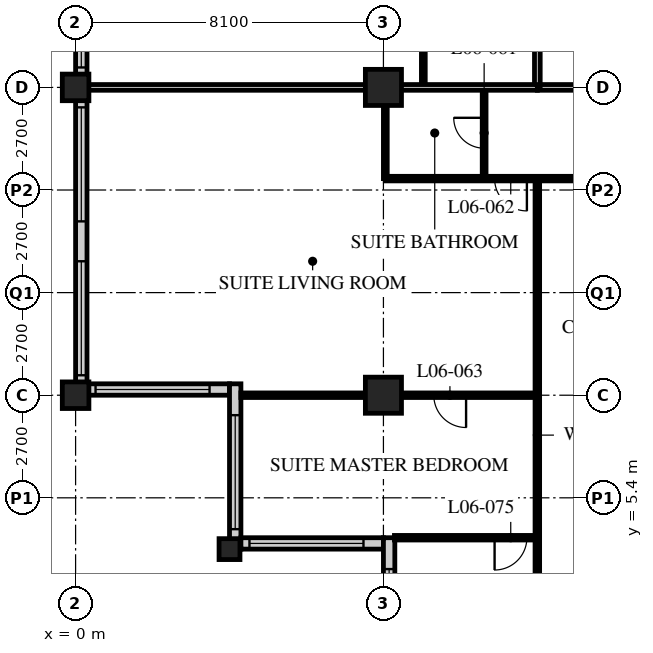
"""IFC4 building model, lengths in metres.
Left out: names, types, materials, properties, quantities, classifications, styles, units other than length and angle.
Written with IfcOpenShell. Run it as: python <this file> out.ifc"""

import sys

from ifc_helpers import new_model, si_unit, direction, frame, frame_2d, origin, origin_2d, place, context, subcontext, project, spatial, rectangle, hollow_rectangle, extrude, element, fill, save


model = new_model("IFC4")
c1 = context("Model", 3, precision=1e-05, world=origin(), true_north=direction((0.0, 1.0)))
c2 = subcontext(c1, "Body", "Model", "MODEL_VIEW")
j1 = project(units=[si_unit("LENGTHUNIT", "METRE"), si_unit("PLANEANGLEUNIT", "RADIAN")], contexts=[c1])
p1 = place(None, origin())
s1 = spatial("IfcSite", under=j1, at=p1, CompositionType="ELEMENT")
p2 = place(p1, origin())
s2 = spatial("IfcBuilding", under=s1, at=p2, CompositionType="ELEMENT")
p3 = place(p2, frame((0.0, 0.0, 33.0)))
s3 = spatial("IfcBuildingStorey", under=s2, at=p3, CompositionType="ELEMENT", Elevation=33.0)
for number, where, z_axis, x_axis in (
    (1, (0.0, 8.1, 0.0), (0.0, 0.0, 1.0), (1.0, 0.0, 0.0)),
    (2, (0.0, 16.2, 0.0), (0.0, 0.0, 1.0), (1.0, 0.0, 0.0)),
):
    element("IfcColumn", number, at=place(p3, frame(where, z_axis=z_axis, x_axis=x_axis)), inside=s3, PredefinedType="COLUMN", context=c2, shape_type="SweptSolid", body=[
        extrude(hollow_rectangle(XDim=0.7, YDim=0.7, WallThickness=0.06, at=origin_2d()), origin(), (0.0, 0.0, 1.0), 3.4),
    ])
p4 = place(p3, frame((4.05, 4.05, 0.0), z_axis=(0.0, 0.0, 1.0), x_axis=(1.0, 0.0, 0.0)))
e3 = element("IfcColumn", 3, at=p4, inside=s3, PredefinedType="COLUMN", context=c2, shape_type="SweptSolid", body=[
    extrude(hollow_rectangle(XDim=0.55, YDim=0.55, WallThickness=0.05, at=origin_2d()), origin(), (0.0, 0.0, 1.0), 3.4),
])
for number, where, z_axis, x_axis in (
    (4, (8.1, 8.1, 0.0), (0.0, 0.0, 1.0), (1.0, 0.0, 0.0)),
    (5, (8.1, 16.2, 0.0), (0.0, 0.0, 1.0), (1.0, 0.0, 0.0)),
):
    element("IfcColumn", number, at=place(p3, frame(where, z_axis=z_axis, x_axis=x_axis)), inside=s3, PredefinedType="COLUMN", context=c2, shape_type="SweptSolid", body=[
        extrude(hollow_rectangle(XDim=0.95, YDim=0.95, WallThickness=0.095, at=origin_2d()), origin(), (0.0, 0.0, 1.0), 3.4),
    ])
p5 = place(p3, frame((0.15, 40.2, 0.0), z_axis=(0.0, 0.0, 1.0), x_axis=(0.0, -1.0, 0.0)))
e6 = element("IfcWall", 6, at=p5, inside=s3, PredefinedType="SOLIDWALL", context=c2, shape_type="SweptSolid", body=[
    extrude(rectangle(XDim=32.1, YDim=0.3, at=frame_2d((16.05, 0.0))), origin(), (0.0, 0.0, 1.0), 3.19),
])
p6 = place(p5, frame((0.225, 0.0, 0.9)))
e7 = element("IfcOpeningElement", 7, at=p6, cuts=e6, PredefinedType="OPENING", context=c2, shape_type="SweptSolid", body=[
    extrude(rectangle(XDim=3.0, YDim=2.0, at=frame_2d((1.5, 1.0))), frame((0.0, 0.16, 0.0), z_axis=(0.0, -1.0, 0.0), x_axis=(1.0, 0.0, 0.0)), (0.0, 0.0, 1.0), 0.32),
])
p7 = place(p5, frame((4.275, 0.0, 0.9)))
e8 = element("IfcOpeningElement", 8, at=p7, cuts=e6, PredefinedType="OPENING", context=c2, shape_type="SweptSolid", body=[
    extrude(rectangle(XDim=3.0, YDim=2.0, at=frame_2d((1.5, 1.0))), frame((0.0, 0.16, 0.0), z_axis=(0.0, -1.0, 0.0), x_axis=(1.0, 0.0, 0.0)), (0.0, 0.0, 1.0), 0.32),
])
p8 = place(p5, frame((8.325, 0.0, 0.9)))
e9 = element("IfcOpeningElement", 9, at=p8, cuts=e6, PredefinedType="OPENING", context=c2, shape_type="SweptSolid", body=[
    extrude(rectangle(XDim=3.0, YDim=2.0, at=frame_2d((1.5, 1.0))), frame((0.0, 0.16, 0.0), z_axis=(0.0, -1.0, 0.0), x_axis=(1.0, 0.0, 0.0)), (0.0, 0.0, 1.0), 0.32),
])
p9 = place(p5, frame((12.375, 0.0, 0.9)))
e10 = element("IfcOpeningElement", 10, at=p9, cuts=e6, PredefinedType="OPENING", context=c2, shape_type="SweptSolid", body=[
    extrude(rectangle(XDim=3.0, YDim=2.0, at=frame_2d((1.5, 1.0))), frame((0.0, 0.16, 0.0), z_axis=(0.0, -1.0, 0.0), x_axis=(1.0, 0.0, 0.0)), (0.0, 0.0, 1.0), 0.32),
])
p10 = place(p5, frame((16.425, 0.0, 0.9)))
e11 = element("IfcOpeningElement", 11, at=p10, cuts=e6, PredefinedType="OPENING", context=c2, shape_type="SweptSolid", body=[
    extrude(rectangle(XDim=3.0, YDim=2.0, at=frame_2d((1.5, 1.0))), frame((0.0, 0.16, 0.0), z_axis=(0.0, -1.0, 0.0), x_axis=(1.0, 0.0, 0.0)), (0.0, 0.0, 1.0), 0.32),
])
p11 = place(p5, frame((20.475, 0.0, 0.9)))
e12 = element("IfcOpeningElement", 12, at=p11, cuts=e6, PredefinedType="OPENING", context=c2, shape_type="SweptSolid", body=[
    extrude(rectangle(XDim=3.0, YDim=2.0, at=frame_2d((1.5, 1.0))), frame((0.0, 0.16, 0.0), z_axis=(0.0, -1.0, 0.0), x_axis=(1.0, 0.0, 0.0)), (0.0, 0.0, 1.0), 0.32),
])
p12 = place(p5, frame((24.525, 0.0, 0.9)))
e13 = element("IfcOpeningElement", 13, at=p12, cuts=e6, PredefinedType="OPENING", context=c2, shape_type="SweptSolid", body=[
    extrude(rectangle(XDim=3.0, YDim=2.0, at=frame_2d((1.5, 1.0))), frame((0.0, 0.16, 0.0), z_axis=(0.0, -1.0, 0.0), x_axis=(1.0, 0.0, 0.0)), (0.0, 0.0, 1.0), 0.32),
])
p13 = place(p5, frame((28.575, 0.0, 0.9)))
e14 = element("IfcOpeningElement", 14, at=p13, cuts=e6, PredefinedType="OPENING", context=c2, shape_type="SweptSolid", body=[
    extrude(rectangle(XDim=3.0, YDim=2.0, at=frame_2d((1.5, 1.0))), frame((0.0, 0.16, 0.0), z_axis=(0.0, -1.0, 0.0), x_axis=(1.0, 0.0, 0.0)), (0.0, 0.0, 1.0), 0.32),
])
p14 = place(p3, frame((0.3, 8.25, 0.0), z_axis=(0.0, 0.0, 1.0), x_axis=(1.0, 0.0, 0.0)))
e15 = element("IfcWall", 15, at=p14, inside=s3, PredefinedType="SOLIDWALL", context=c2, shape_type="SweptSolid", body=[
    extrude(rectangle(XDim=3.75, YDim=0.3, at=frame_2d((1.875, 0.0))), origin(), (0.0, 0.0, 1.0), 3.19),
])
p15 = place(p14, frame((0.225, 0.0, 0.9)))
e16 = element("IfcOpeningElement", 16, at=p15, cuts=e15, PredefinedType="OPENING", context=c2, shape_type="SweptSolid", body=[
    extrude(rectangle(XDim=3.0, YDim=1.5, at=frame_2d((1.5, 0.75))), frame((0.0, 0.16, 0.0), z_axis=(0.0, -1.0, 0.0), x_axis=(1.0, 0.0, 0.0)), (0.0, 0.0, 1.0), 0.32),
])
p16 = place(p3, frame((4.2, 8.4, 0.0), z_axis=(0.0, 0.0, 1.0), x_axis=(0.0, -1.0, 0.0)))
e17 = element("IfcWall", 17, at=p16, inside=s3, PredefinedType="SOLIDWALL", context=c2, shape_type="SweptSolid", body=[
    extrude(rectangle(XDim=4.35, YDim=0.3, at=frame_2d((2.175, 0.0))), origin(), (0.0, 0.0, 1.0), 3.19),
])
p17 = place(p16, frame((0.825, 0.0, 0.9)))
e18 = element("IfcOpeningElement", 18, at=p17, cuts=e17, PredefinedType="OPENING", context=c2, shape_type="SweptSolid", body=[
    extrude(rectangle(XDim=3.0, YDim=1.5, at=frame_2d((1.5, 0.75))), frame((0.0, 0.16, 0.0), z_axis=(0.0, -1.0, 0.0), x_axis=(1.0, 0.0, 0.0)), (0.0, 0.0, 1.0), 0.32),
])
p18 = place(p3, frame((4.35, 4.2, 0.0), z_axis=(0.0, 0.0, 1.0), x_axis=(1.0, 0.0, 0.0)))
e19 = element("IfcWall", 19, at=p18, inside=s3, PredefinedType="SOLIDWALL", context=c2, shape_type="SweptSolid", body=[
    extrude(rectangle(XDim=3.75, YDim=0.3, at=frame_2d((1.875, 0.0))), origin(), (0.0, 0.0, 1.0), 3.19),
])
p19 = place(p18, frame((0.225, 0.0, 0.9)))
e20 = element("IfcOpeningElement", 20, at=p19, cuts=e19, PredefinedType="OPENING", context=c2, shape_type="SweptSolid", body=[
    extrude(rectangle(XDim=3.0, YDim=1.5, at=frame_2d((1.5, 0.75))), frame((0.0, 0.16, 0.0), z_axis=(0.0, -1.0, 0.0), x_axis=(1.0, 0.0, 0.0)), (0.0, 0.0, 1.0), 0.32),
])
p20 = place(p3, frame((8.25, 4.35, 0.0), z_axis=(0.0, 0.0, 1.0), x_axis=(0.0, -1.0, 0.0)))
e21 = element("IfcWall", 21, at=p20, inside=s3, PredefinedType="SOLIDWALL", context=c2, shape_type="SweptSolid", body=[
    extrude(rectangle(XDim=4.35, YDim=0.3, at=frame_2d((2.175, 0.0))), origin(), (0.0, 0.0, 1.0), 3.19),
])
p21 = place(p20, frame((0.825, 0.0, 0.9)))
e22 = element("IfcOpeningElement", 22, at=p21, cuts=e21, PredefinedType="OPENING", context=c2, shape_type="SweptSolid", body=[
    extrude(rectangle(XDim=3.0, YDim=1.5, at=frame_2d((1.5, 0.75))), frame((0.0, 0.16, 0.0), z_axis=(0.0, -1.0, 0.0), x_axis=(1.0, 0.0, 0.0)), (0.0, 0.0, 1.0), 0.32),
])
p22 = place(p3, frame((12.15, 16.2, 0.0), z_axis=(0.0, 0.0, 1.0), x_axis=(1.0, 0.0, 0.0)))
e23 = element("IfcWall", 23, at=p22, inside=s3, PredefinedType="PARTITIONING", context=c2, shape_type="SweptSolid", body=[
    extrude(rectangle(XDim=32.4, YDim=0.15, at=frame_2d((16.2, 0.0))), origin(), (0.0, 0.0, 1.0), 2.578),
])
p23 = place(p22, frame((6.5, 0.0, 0.0)))
e24 = element("IfcOpeningElement", 24, at=p23, cuts=e23, PredefinedType="OPENING", context=c2, shape_type="SweptSolid", body=[
    extrude(rectangle(XDim=1.0, YDim=2.1, at=frame_2d((0.5, 1.05))), frame((0.0, 0.085, 0.0), z_axis=(0.0, -1.0, 0.0), x_axis=(1.0, 0.0, 0.0)), (0.0, 0.0, 1.0), 0.17),
])
p24 = place(p22, frame((8.4, 0.0, 0.0)))
e25 = element("IfcOpeningElement", 25, at=p24, cuts=e23, PredefinedType="OPENING", context=c2, shape_type="SweptSolid", body=[
    extrude(rectangle(XDim=1.0, YDim=2.1, at=frame_2d((0.5, 1.05))), frame((0.0, 0.085, 0.0), z_axis=(0.0, -1.0, 0.0), x_axis=(1.0, 0.0, 0.0)), (0.0, 0.0, 1.0), 0.17),
])
p25 = place(p22, frame((14.6, 0.0, 0.0)))
e26 = element("IfcOpeningElement", 26, at=p25, cuts=e23, PredefinedType="OPENING", context=c2, shape_type="SweptSolid", body=[
    extrude(rectangle(XDim=1.0, YDim=2.1, at=frame_2d((0.5, 1.05))), frame((0.0, 0.085, 0.0), z_axis=(0.0, -1.0, 0.0), x_axis=(1.0, 0.0, 0.0)), (0.0, 0.0, 1.0), 0.17),
])
p26 = place(p22, frame((16.5, 0.0, 0.0)))
e27 = element("IfcOpeningElement", 27, at=p26, cuts=e23, PredefinedType="OPENING", context=c2, shape_type="SweptSolid", body=[
    extrude(rectangle(XDim=1.0, YDim=2.1, at=frame_2d((0.5, 1.05))), frame((0.0, 0.085, 0.0), z_axis=(0.0, -1.0, 0.0), x_axis=(1.0, 0.0, 0.0)), (0.0, 0.0, 1.0), 0.17),
])
p27 = place(p22, frame((23.0, 0.0, 0.0)))
e28 = element("IfcOpeningElement", 28, at=p27, cuts=e23, PredefinedType="OPENING", context=c2, shape_type="SweptSolid", body=[
    extrude(rectangle(XDim=1.0, YDim=2.1, at=frame_2d((0.5, 1.05))), frame((0.0, 0.085, 0.0), z_axis=(0.0, -1.0, 0.0), x_axis=(1.0, 0.0, 0.0)), (0.0, 0.0, 1.0), 0.17),
])
p28 = place(p22, frame((24.6, 0.0, 0.0)))
e29 = element("IfcOpeningElement", 29, at=p28, cuts=e23, PredefinedType="OPENING", context=c2, shape_type="SweptSolid", body=[
    extrude(rectangle(XDim=1.0, YDim=2.1, at=frame_2d((0.5, 1.05))), frame((0.0, 0.085, 0.0), z_axis=(0.0, -1.0, 0.0), x_axis=(1.0, 0.0, 0.0)), (0.0, 0.0, 1.0), 0.17),
])
p29 = place(p22, frame((1.525, 0.0, 0.0)))
e30 = element("IfcOpeningElement", 30, at=p29, cuts=e23, PredefinedType="OPENING", context=c2, shape_type="SweptSolid", body=[
    extrude(rectangle(XDim=1.0, YDim=2.1, at=frame_2d((0.5, 1.05))), frame((0.0, 0.085, 0.0), z_axis=(0.0, -1.0, 0.0), x_axis=(1.0, 0.0, 0.0)), (0.0, 0.0, 1.0), 0.17),
])
p30 = place(p22, frame((29.875, 0.0, 0.0)))
e31 = element("IfcOpeningElement", 31, at=p30, cuts=e23, PredefinedType="OPENING", context=c2, shape_type="SweptSolid", body=[
    extrude(rectangle(XDim=1.0, YDim=2.1, at=frame_2d((0.5, 1.05))), frame((0.0, 0.085, 0.0), z_axis=(0.0, -1.0, 0.0), x_axis=(1.0, 0.0, 0.0)), (0.0, 0.0, 1.0), 0.17),
])
p31 = place(p3, frame((12.15, 16.2, 0.0), z_axis=(0.0, 0.0, 1.0), x_axis=(0.0, 1.0, 0.0)))
e32 = element("IfcWall", 32, at=p31, inside=s3, PredefinedType="PARTITIONING", context=c2, shape_type="SweptSolid", body=[
    extrude(rectangle(XDim=26.1, YDim=0.15, at=frame_2d((13.05, 0.0))), origin(), (0.0, 0.0, 1.0), 3.19),
])
p32 = place(p31, frame((2.75, 0.0, 0.0)))
e33 = element("IfcOpeningElement", 33, at=p32, cuts=e32, PredefinedType="OPENING", context=c2, shape_type="SweptSolid", body=[
    extrude(rectangle(XDim=1.0, YDim=2.1, at=frame_2d((0.5, 1.05))), frame((0.0, 0.085, 0.0), z_axis=(0.0, -1.0, 0.0), x_axis=(1.0, 0.0, 0.0)), (0.0, 0.0, 1.0), 0.17),
])
p33 = place(p31, frame((4.35, 0.0, 0.0)))
e34 = element("IfcOpeningElement", 34, at=p33, cuts=e32, PredefinedType="OPENING", context=c2, shape_type="SweptSolid", body=[
    extrude(rectangle(XDim=1.0, YDim=2.1, at=frame_2d((0.5, 1.05))), frame((0.0, 0.085, 0.0), z_axis=(0.0, -1.0, 0.0), x_axis=(1.0, 0.0, 0.0)), (0.0, 0.0, 1.0), 0.17),
])
p34 = place(p31, frame((10.55, 0.0, 0.0)))
e35 = element("IfcOpeningElement", 35, at=p34, cuts=e32, PredefinedType="OPENING", context=c2, shape_type="SweptSolid", body=[
    extrude(rectangle(XDim=1.0, YDim=2.1, at=frame_2d((0.5, 1.05))), frame((0.0, 0.085, 0.0), z_axis=(0.0, -1.0, 0.0), x_axis=(1.0, 0.0, 0.0)), (0.0, 0.0, 1.0), 0.17),
])
p35 = place(p31, frame((12.45, 0.0, 0.0)))
e36 = element("IfcOpeningElement", 36, at=p35, cuts=e32, PredefinedType="OPENING", context=c2, shape_type="SweptSolid", body=[
    extrude(rectangle(XDim=1.0, YDim=2.1, at=frame_2d((0.5, 1.05))), frame((0.0, 0.085, 0.0), z_axis=(0.0, -1.0, 0.0), x_axis=(1.0, 0.0, 0.0)), (0.0, 0.0, 1.0), 0.17),
])
p36 = place(p31, frame((18.65, 0.0, 0.0)))
e37 = element("IfcOpeningElement", 37, at=p36, cuts=e32, PredefinedType="OPENING", context=c2, shape_type="SweptSolid", body=[
    extrude(rectangle(XDim=1.0, YDim=2.1, at=frame_2d((0.5, 1.05))), frame((0.0, 0.085, 0.0), z_axis=(0.0, -1.0, 0.0), x_axis=(1.0, 0.0, 0.0)), (0.0, 0.0, 1.0), 0.17),
])
p37 = place(p31, frame((22.65, 0.0, 0.0)))
e38 = element("IfcOpeningElement", 38, at=p37, cuts=e32, PredefinedType="OPENING", context=c2, shape_type="SweptSolid", body=[
    extrude(rectangle(XDim=1.0, YDim=2.1, at=frame_2d((0.5, 1.05))), frame((0.0, 0.085, 0.0), z_axis=(0.0, -1.0, 0.0), x_axis=(1.0, 0.0, 0.0)), (0.0, 0.0, 1.0), 0.17),
])
p38 = place(p3, frame((9.15, 16.2, 0.0), z_axis=(0.0, 0.0, 1.0), x_axis=(0.0, 1.0, 0.0)))
e39 = element("IfcWall", 39, at=p38, inside=s3, PredefinedType="PARTITIONING", context=c2, shape_type="SweptSolid", body=[
    extrude(rectangle(XDim=2.6, YDim=0.1, at=frame_2d((1.3, 0.0))), origin(), (0.0, 0.0, 1.0), 3.19),
])
p39 = place(p3, frame((10.75, 16.2, 0.0), z_axis=(0.0, 0.0, 1.0), x_axis=(0.0, -1.0, 0.0)))
e40 = element("IfcWall", 40, at=p39, inside=s3, PredefinedType="PARTITIONING", context=c2, shape_type="SweptSolid", body=[
    extrude(rectangle(XDim=2.4, YDim=0.1, at=frame_2d((1.2, 0.0))), origin(), (0.0, 0.0, 1.0), 3.19),
])
p40 = place(p39, frame((0.8, 0.0, 0.0)))
e41 = element("IfcOpeningElement", 41, at=p40, cuts=e40, PredefinedType="OPENING", context=c2, shape_type="SweptSolid", body=[
    extrude(rectangle(XDim=0.8, YDim=2.1, at=frame_2d((0.4, 1.05))), frame((0.0, 0.06, 0.0), z_axis=(0.0, -1.0, 0.0), x_axis=(1.0, 0.0, 0.0)), (0.0, 0.0, 1.0), 0.12),
])
p41 = place(p3, frame((8.15, 16.2, 0.0), z_axis=(0.0, 0.0, 1.0), x_axis=(0.0, -1.0, 0.0)))
e42 = element("IfcWall", 42, at=p41, inside=s3, PredefinedType="PARTITIONING", context=c2, shape_type="SweptSolid", body=[
    extrude(rectangle(XDim=2.4, YDim=0.1, at=frame_2d((1.2, 0.0))), origin(), (0.0, 0.0, 1.0), 2.578),
])
p42 = place(p3, frame((8.15, 13.8, 0.0), z_axis=(0.0, 0.0, 1.0), x_axis=(1.0, 0.0, 0.0)))
e43 = element("IfcWall", 43, at=p42, inside=s3, PredefinedType="PARTITIONING", context=c2, shape_type="SweptSolid", body=[
    extrude(rectangle(XDim=8.05, YDim=0.12, at=frame_2d((4.025, 0.0))), origin(), (0.0, 0.0, 1.0), 3.19),
])
p43 = place(p42, frame((6.725, 0.0, 0.0)))
e44 = element("IfcOpeningElement", 44, at=p43, cuts=e43, PredefinedType="OPENING", context=c2, shape_type="SweptSolid", body=[
    extrude(rectangle(XDim=0.85, YDim=2.1, at=frame_2d((0.425, 1.05))), frame((0.0, 0.07, 0.0), z_axis=(0.0, -1.0, 0.0), x_axis=(1.0, 0.0, 0.0)), (0.0, 0.0, 1.0), 0.14),
])
p44 = place(p42, frame((2.875, 0.0, 0.0)))
e45 = element("IfcOpeningElement", 45, at=p44, cuts=e43, PredefinedType="OPENING", context=c2, shape_type="SweptSolid", body=[
    extrude(rectangle(XDim=0.85, YDim=2.1, at=frame_2d((0.425, 1.05))), frame((0.0, 0.07, 0.0), z_axis=(0.0, -1.0, 0.0), x_axis=(1.0, 0.0, 0.0)), (0.0, 0.0, 1.0), 0.14),
])
p45 = place(p3, frame((12.15, 13.8, 0.0), z_axis=(0.0, 0.0, 1.0), x_axis=(0.0, -1.0, 0.0)))
e46 = element("IfcWall", 46, at=p45, inside=s3, PredefinedType="PARTITIONING", context=c2, shape_type="SweptSolid", body=[
    extrude(rectangle(XDim=13.5, YDim=0.12, at=frame_2d((6.75, 0.0))), origin(), (0.0, 0.0, 1.0), 3.19),
])
p46 = place(p3, frame((12.15, 8.1, 0.0), z_axis=(0.0, 0.0, 1.0), x_axis=(-1.0, 0.0, 0.0)))
e47 = element("IfcWall", 47, at=p46, inside=s3, PredefinedType="PARTITIONING", context=c2, shape_type="SweptSolid", body=[
    extrude(rectangle(XDim=7.8, YDim=0.12, at=frame_2d((3.9, 0.0))), origin(), (0.0, 0.0, 1.0), 2.578),
])
p47 = place(p46, frame((1.875, 0.0, 0.0)))
e48 = element("IfcOpeningElement", 48, at=p47, cuts=e47, PredefinedType="OPENING", context=c2, shape_type="SweptSolid", body=[
    extrude(rectangle(XDim=0.85, YDim=2.1, at=frame_2d((0.425, 1.05))), frame((0.0, 0.07, 0.0), z_axis=(0.0, -1.0, 0.0), x_axis=(1.0, 0.0, 0.0)), (0.0, 0.0, 1.0), 0.14),
])
p48 = place(p3, frame((0.3, 16.2, 0.0), z_axis=(0.0, 0.0, 1.0), x_axis=(1.0, 0.0, 0.0)))
e49 = element("IfcWall", 49, at=p48, inside=s3, PredefinedType="PARTITIONING", context=c2, shape_type="SweptSolid", body=[
    extrude(rectangle(XDim=11.85, YDim=0.15, at=frame_2d((5.925, 0.0))), origin(), (0.0, 0.0, 1.0), 2.578),
])
p49 = place(p3, frame((8.39, 4.35, 0.0), z_axis=(0.0, 0.0, 1.0), x_axis=(1.0, 0.0, 0.0)))
e50 = element("IfcWall", 50, at=p49, inside=s3, PredefinedType="PARTITIONING", context=c2, shape_type="SweptSolid", body=[
    extrude(rectangle(XDim=3.76, YDim=0.12, at=frame_2d((1.88, 0.0))), origin(), (0.0, 0.0, 1.0), 3.19),
])
p50 = place(p49, frame((2.635, 0.0, 0.0)))
e51 = element("IfcOpeningElement", 51, at=p50, cuts=e50, PredefinedType="OPENING", context=c2, shape_type="SweptSolid", body=[
    extrude(rectangle(XDim=0.85, YDim=2.1, at=frame_2d((0.425, 1.05))), frame((0.0, 0.07, 0.0), z_axis=(0.0, -1.0, 0.0), x_axis=(1.0, 0.0, 0.0)), (0.0, 0.0, 1.0), 0.14),
])
p51 = place(p11, origin())
e52 = element("IfcWindow", 52, at=p51, inside=s3, PartitioningType="SINGLE_PANEL", PredefinedType="WINDOW", context=c2, shape_type="SweptSolid", body=[
    extrude(rectangle(XDim=3.0, YDim=2.0, at=frame_2d((1.5, 1.0))), frame((0.0, 0.03, 0.0), z_axis=(0.0, -1.0, 0.0), x_axis=(1.0, 0.0, 0.0)), (0.0, 0.0, 1.0), 0.06),
])
fill(e12, e52)
p52 = place(p12, origin())
e53 = element("IfcWindow", 53, at=p52, inside=s3, PartitioningType="SINGLE_PANEL", PredefinedType="WINDOW", context=c2, shape_type="SweptSolid", body=[
    extrude(rectangle(XDim=3.0, YDim=2.0, at=frame_2d((1.5, 1.0))), frame((0.0, 0.03, 0.0), z_axis=(0.0, -1.0, 0.0), x_axis=(1.0, 0.0, 0.0)), (0.0, 0.0, 1.0), 0.06),
])
fill(e13, e53)
p53 = place(p13, origin())
e54 = element("IfcWindow", 54, at=p53, inside=s3, PartitioningType="SINGLE_PANEL", PredefinedType="WINDOW", context=c2, shape_type="SweptSolid", body=[
    extrude(rectangle(XDim=3.0, YDim=2.0, at=frame_2d((1.5, 1.0))), frame((0.0, 0.03, 0.0), z_axis=(0.0, -1.0, 0.0), x_axis=(1.0, 0.0, 0.0)), (0.0, 0.0, 1.0), 0.06),
])
fill(e14, e54)
p54 = place(p15, origin())
e55 = element("IfcWindow", 55, at=p54, inside=s3, PartitioningType="SINGLE_PANEL", PredefinedType="WINDOW", context=c2, shape_type="SweptSolid", body=[
    extrude(rectangle(XDim=3.0, YDim=1.5, at=frame_2d((1.5, 0.75))), frame((0.0, 0.03, 0.0), z_axis=(0.0, -1.0, 0.0), x_axis=(1.0, 0.0, 0.0)), (0.0, 0.0, 1.0), 0.06),
])
fill(e16, e55)
p55 = place(p17, origin())
e56 = element("IfcWindow", 56, at=p55, inside=s3, PartitioningType="SINGLE_PANEL", PredefinedType="WINDOW", context=c2, shape_type="SweptSolid", body=[
    extrude(rectangle(XDim=3.0, YDim=1.5, at=frame_2d((1.5, 0.75))), frame((0.0, 0.03, 0.0), z_axis=(0.0, -1.0, 0.0), x_axis=(1.0, 0.0, 0.0)), (0.0, 0.0, 1.0), 0.06),
])
fill(e18, e56)
p56 = place(p19, origin())
e57 = element("IfcWindow", 57, at=p56, inside=s3, PartitioningType="SINGLE_PANEL", PredefinedType="WINDOW", context=c2, shape_type="SweptSolid", body=[
    extrude(rectangle(XDim=3.0, YDim=1.5, at=frame_2d((1.5, 0.75))), frame((0.0, 0.03, 0.0), z_axis=(0.0, -1.0, 0.0), x_axis=(1.0, 0.0, 0.0)), (0.0, 0.0, 1.0), 0.06),
])
fill(e20, e57)
p57 = place(p21, origin())
e58 = element("IfcWindow", 58, at=p57, inside=s3, PartitioningType="SINGLE_PANEL", PredefinedType="WINDOW", context=c2, shape_type="SweptSolid", body=[
    extrude(rectangle(XDim=3.0, YDim=1.5, at=frame_2d((1.5, 0.75))), frame((0.0, 0.03, 0.0), z_axis=(0.0, -1.0, 0.0), x_axis=(1.0, 0.0, 0.0)), (0.0, 0.0, 1.0), 0.06),
])
fill(e22, e58)
p58 = place(p40, origin())
e59 = element("IfcDoor", 59, at=p58, inside=s3, OperationType="SINGLE_SWING_RIGHT", PredefinedType="DOOR", context=c2, shape_type="SweptSolid", body=[
    extrude(rectangle(XDim=0.8, YDim=2.1, at=frame_2d((0.4, 1.05))), frame((0.0, 0.025, 0.0), z_axis=(0.0, -1.0, 0.0), x_axis=(1.0, 0.0, 0.0)), (0.0, 0.0, 1.0), 0.05),
])
fill(e41, e59)
p59 = place(p44, origin())
e60 = element("IfcDoor", 60, at=p59, inside=s3, OperationType="SINGLE_SWING_LEFT", PredefinedType="DOOR", context=c2, shape_type="SweptSolid", body=[
    extrude(rectangle(XDim=0.85, YDim=2.1, at=frame_2d((0.425, 1.05))), frame((0.0, 0.025, 0.0), z_axis=(0.0, -1.0, 0.0), x_axis=(1.0, 0.0, 0.0)), (0.0, 0.0, 1.0), 0.05),
])
fill(e45, e60)
p60 = place(p47, origin())
e61 = element("IfcDoor", 61, at=p60, inside=s3, OperationType="SINGLE_SWING_LEFT", PredefinedType="DOOR", context=c2, shape_type="SweptSolid", body=[
    extrude(rectangle(XDim=0.85, YDim=2.1, at=frame_2d((0.425, 1.05))), frame((0.0, 0.025, 0.0), z_axis=(0.0, -1.0, 0.0), x_axis=(1.0, 0.0, 0.0)), (0.0, 0.0, 1.0), 0.05),
])
fill(e48, e61)
p61 = place(p50, origin())
e62 = element("IfcDoor", 62, at=p61, inside=s3, OperationType="SINGLE_SWING_RIGHT", PredefinedType="DOOR", context=c2, shape_type="SweptSolid", body=[
    extrude(rectangle(XDim=0.85, YDim=2.1, at=frame_2d((0.425, 1.05))), frame((0.0, 0.025, 0.0), z_axis=(0.0, -1.0, 0.0), x_axis=(1.0, 0.0, 0.0)), (0.0, 0.0, 1.0), 0.05),
])
fill(e51, e62)
save(model, sys.argv[1])
